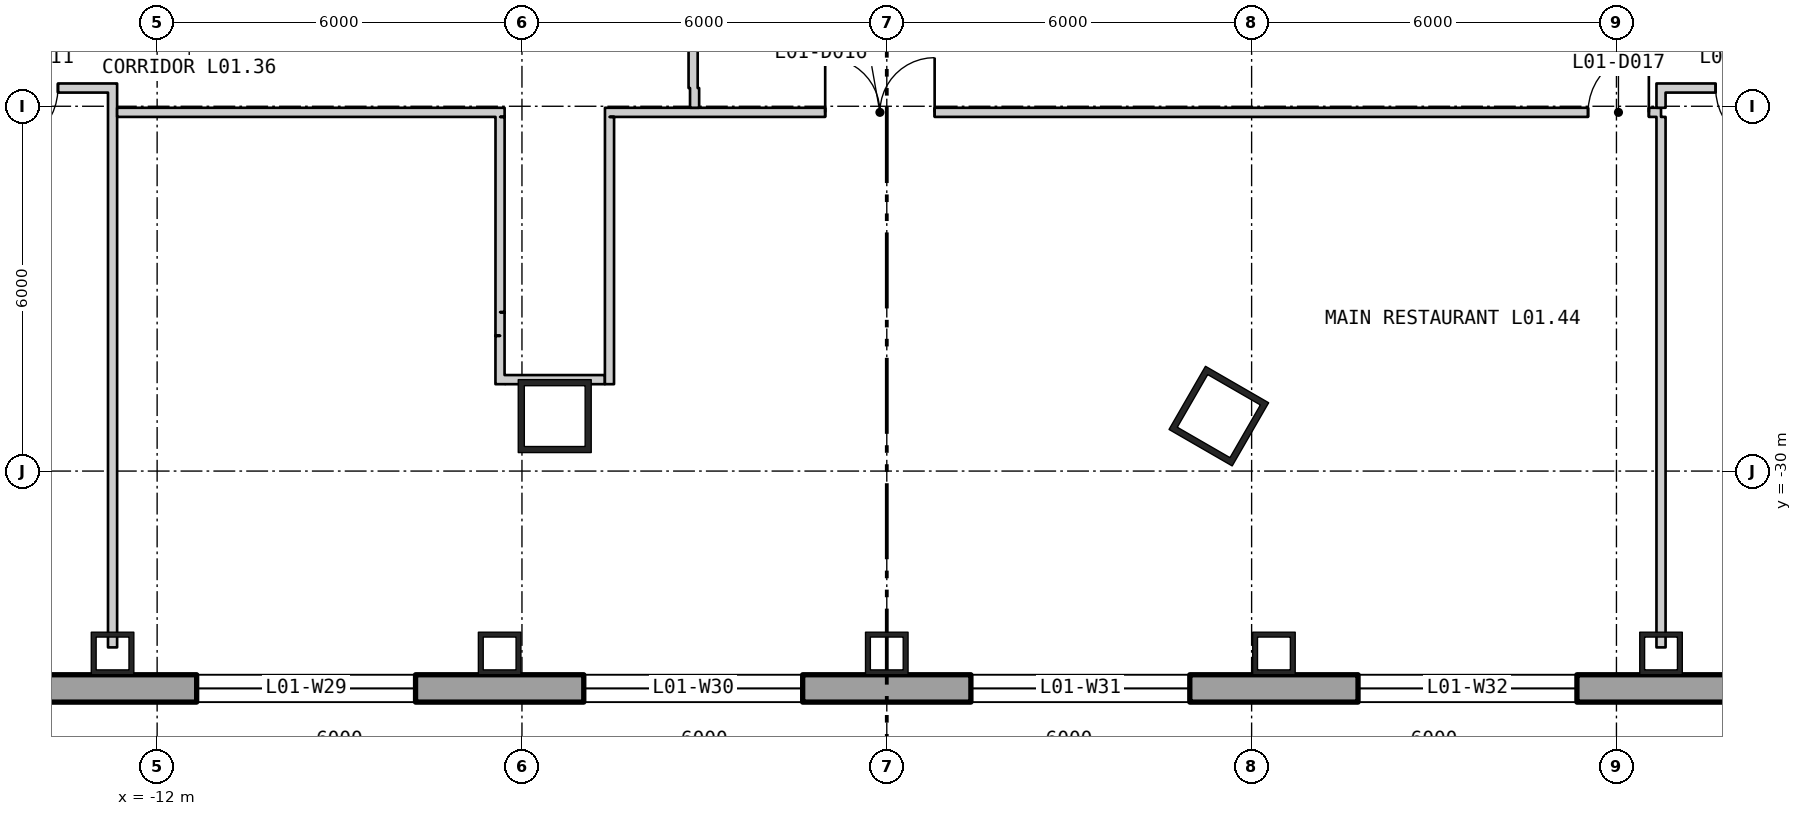
"""IFC4 building model, lengths in metres.
Left out: names, types, materials, properties, quantities, classifications, styles, units other than length and angle.
Written with IfcOpenShell. Run it as: python <this file> out.ifc"""

import sys

from ifc_helpers import new_model, si_unit, direction, frame, frame_2d, origin, origin_2d, place, context, subcontext, project, spatial, polyline, rectangle, hollow_rectangle, outline, extrude, element, fill, save


model = new_model("IFC4")
c1 = context("Model", 3, precision=1e-05, world=origin(), true_north=direction((0.0, 1.0)))
c2 = subcontext(c1, "Body", "Model", "MODEL_VIEW")
j1 = project(units=[si_unit("LENGTHUNIT", "METRE"), si_unit("PLANEANGLEUNIT", "RADIAN")], contexts=[c1])
p1 = place(None, origin())
s1 = spatial("IfcSite", under=j1, at=p1, CompositionType="ELEMENT")
p2 = place(p1, origin())
s2 = spatial("IfcBuilding", under=s1, at=p2, CompositionType="ELEMENT")
p3 = place(p2, frame((0.0, 0.0, 8.4)))
s3 = spatial("IfcBuildingStorey", under=s2, at=p3, CompositionType="ELEMENT", Elevation=8.4)
for number, where, z_axis, x_axis in (
    (1, (-5.461, -29.096, 0.0), (0.0, 0.0, 1.0), (1.0, 0.0, 0.0)),
    (2, (5.461, -29.096, 0.0), (0.0, 0.0, 1.0), (0.5, 0.866, 0.0)),
):
    element("IfcColumn", number, at=place(p3, frame(where, z_axis=z_axis, x_axis=x_axis)), inside=s3, PredefinedType="COLUMN", context=c2, shape_type="SweptSolid", body=[
        extrude(hollow_rectangle(XDim=1.2, YDim=1.2, WallThickness=0.1, at=origin_2d()), origin(), (0.0, 0.0, 1.0), 5.1),
    ])
for number, where, z_axis, x_axis in (
    (3, (-12.733, -33.0, 0.0), (0.0, 0.0, 1.0), (1.0, 0.0, 0.0)),
    (4, (-6.367, -33.0, 0.0), (0.0, 0.0, 1.0), (1.0, 0.0, 0.0)),
    (5, (0.0, -33.0, 0.0), (0.0, 0.0, 1.0), (1.0, 0.0, 0.0)),
    (6, (6.367, -33.0, 0.0), (0.0, 0.0, 1.0), (1.0, 0.0, 0.0)),
    (7, (12.733, -33.0, 0.0), (0.0, 0.0, 1.0), (1.0, 0.0, 0.0)),
):
    element("IfcColumn", number, at=place(p3, frame(where, z_axis=z_axis, x_axis=x_axis)), inside=s3, PredefinedType="COLUMN", context=c2, shape_type="SweptSolid", body=[
        extrude(hollow_rectangle(XDim=0.7, YDim=0.7, WallThickness=0.08, at=origin_2d()), origin(), (0.0, 0.0, 1.0), 5.1),
    ])
p4 = place(p3, frame((-38.775, -33.575, -0.4), z_axis=(0.0, 0.0, 1.0), x_axis=(1.0, 0.0, 0.0)))
e8 = element("IfcWall", 8, at=p4, inside=s3, PredefinedType="SOLIDWALL", context=c2, shape_type="SweptSolid", body=[
    extrude(outline(polyline([(-0.225, -0.225), (77.775, -0.225), (77.325, 0.225), (0.225, 0.225), (-0.225, -0.225)])), origin(), (0.0, 0.0, 1.0), 5.1),
])
p5 = place(p4, frame((1.958, 0.0, 1.3)))
e9 = element("IfcOpeningElement", 9, at=p5, cuts=e8, PredefinedType="OPENING", context=c2, shape_type="SweptSolid", body=[
    extrude(rectangle(XDim=3.6, YDim=3.2, at=frame_2d((1.8, 1.6))), frame((0.0, 0.235, 0.0), z_axis=(0.0, -1.0, 0.0), x_axis=(1.0, 0.0, 0.0)), (0.0, 0.0, 1.0), 0.47),
])
p6 = place(p4, frame((8.325, 0.0, 1.3)))
e10 = element("IfcOpeningElement", 10, at=p6, cuts=e8, PredefinedType="OPENING", context=c2, shape_type="SweptSolid", body=[
    extrude(rectangle(XDim=3.6, YDim=3.2, at=frame_2d((1.8, 1.6))), frame((0.0, 0.235, 0.0), z_axis=(0.0, -1.0, 0.0), x_axis=(1.0, 0.0, 0.0)), (0.0, 0.0, 1.0), 0.47),
])
p7 = place(p4, frame((14.692, 0.0, 1.3)))
e11 = element("IfcOpeningElement", 11, at=p7, cuts=e8, PredefinedType="OPENING", context=c2, shape_type="SweptSolid", body=[
    extrude(rectangle(XDim=3.6, YDim=3.2, at=frame_2d((1.8, 1.6))), frame((0.0, 0.235, 0.0), z_axis=(0.0, -1.0, 0.0), x_axis=(1.0, 0.0, 0.0)), (0.0, 0.0, 1.0), 0.47),
])
p8 = place(p4, frame((21.325, 0.0, 1.3)))
e12 = element("IfcOpeningElement", 12, at=p8, cuts=e8, PredefinedType="OPENING", context=c2, shape_type="SweptSolid", body=[
    extrude(rectangle(XDim=3.6, YDim=3.2, at=frame_2d((1.8, 1.6))), frame((0.0, 0.235, 0.0), z_axis=(0.0, -1.0, 0.0), x_axis=(1.0, 0.0, 0.0)), (0.0, 0.0, 1.0), 0.47),
])
p9 = place(p4, frame((27.425, 0.0, 1.3)))
e13 = element("IfcOpeningElement", 13, at=p9, cuts=e8, PredefinedType="OPENING", context=c2, shape_type="SweptSolid", body=[
    extrude(rectangle(XDim=3.6, YDim=3.2, at=frame_2d((1.8, 1.6))), frame((0.0, 0.235, 0.0), z_axis=(0.0, -1.0, 0.0), x_axis=(1.0, 0.0, 0.0)), (0.0, 0.0, 1.0), 0.47),
])
p10 = place(p4, frame((33.792, 0.0, 1.3)))
e14 = element("IfcOpeningElement", 14, at=p10, cuts=e8, PredefinedType="OPENING", context=c2, shape_type="SweptSolid", body=[
    extrude(rectangle(XDim=3.6, YDim=3.2, at=frame_2d((1.8, 1.6))), frame((0.0, 0.235, 0.0), z_axis=(0.0, -1.0, 0.0), x_axis=(1.0, 0.0, 0.0)), (0.0, 0.0, 1.0), 0.47),
])
p11 = place(p4, frame((40.158, 0.0, 1.3)))
e15 = element("IfcOpeningElement", 15, at=p11, cuts=e8, PredefinedType="OPENING", context=c2, shape_type="SweptSolid", body=[
    extrude(rectangle(XDim=3.6, YDim=3.2, at=frame_2d((1.8, 1.6))), frame((0.0, 0.235, 0.0), z_axis=(0.0, -1.0, 0.0), x_axis=(1.0, 0.0, 0.0)), (0.0, 0.0, 1.0), 0.47),
])
p12 = place(p4, frame((46.525, 0.0, 1.3)))
e16 = element("IfcOpeningElement", 16, at=p12, cuts=e8, PredefinedType="OPENING", context=c2, shape_type="SweptSolid", body=[
    extrude(rectangle(XDim=3.6, YDim=3.2, at=frame_2d((1.8, 1.6))), frame((0.0, 0.235, 0.0), z_axis=(0.0, -1.0, 0.0), x_axis=(1.0, 0.0, 0.0)), (0.0, 0.0, 1.0), 0.47),
])
p13 = place(p4, frame((52.625, 0.0, 1.3)))
e17 = element("IfcOpeningElement", 17, at=p13, cuts=e8, PredefinedType="OPENING", context=c2, shape_type="SweptSolid", body=[
    extrude(rectangle(XDim=3.6, YDim=3.2, at=frame_2d((1.8, 1.6))), frame((0.0, 0.235, 0.0), z_axis=(0.0, -1.0, 0.0), x_axis=(1.0, 0.0, 0.0)), (0.0, 0.0, 1.0), 0.47),
])
p14 = place(p4, frame((59.258, 0.0, 1.3)))
e18 = element("IfcOpeningElement", 18, at=p14, cuts=e8, PredefinedType="OPENING", context=c2, shape_type="SweptSolid", body=[
    extrude(rectangle(XDim=3.6, YDim=3.2, at=frame_2d((1.8, 1.6))), frame((0.0, 0.235, 0.0), z_axis=(0.0, -1.0, 0.0), x_axis=(1.0, 0.0, 0.0)), (0.0, 0.0, 1.0), 0.47),
])
p15 = place(p4, frame((65.625, 0.0, 1.3)))
e19 = element("IfcOpeningElement", 19, at=p15, cuts=e8, PredefinedType="OPENING", context=c2, shape_type="SweptSolid", body=[
    extrude(rectangle(XDim=3.6, YDim=3.2, at=frame_2d((1.8, 1.6))), frame((0.0, 0.235, 0.0), z_axis=(0.0, -1.0, 0.0), x_axis=(1.0, 0.0, 0.0)), (0.0, 0.0, 1.0), 0.47),
])
p16 = place(p4, frame((71.992, 0.0, 1.3)))
e20 = element("IfcOpeningElement", 20, at=p16, cuts=e8, PredefinedType="OPENING", context=c2, shape_type="SweptSolid", body=[
    extrude(rectangle(XDim=3.6, YDim=3.2, at=frame_2d((1.8, 1.6))), frame((0.0, 0.235, 0.0), z_axis=(0.0, -1.0, 0.0), x_axis=(1.0, 0.0, 0.0)), (0.0, 0.0, 1.0), 0.47),
])
p17 = place(p3, frame((-15.35, -23.7, 0.0), z_axis=(0.0, 0.0, 1.0), x_axis=(1.0, 0.0, 0.0)))
e21 = element("IfcWall", 21, at=p17, inside=s3, PredefinedType="PARTITIONING", context=c2, shape_type="SweptSolid", body=[
    extrude(rectangle(XDim=2.542, YDim=0.15, at=frame_2d((1.271, 0.0))), origin(), (0.0, 0.0, 1.0), 4.88),
])
p18 = place(p17, frame((0.719, 0.0, 0.0)))
e22 = element("IfcOpeningElement", 22, at=p18, cuts=e21, PredefinedType="OPENING", context=c2, shape_type="SweptSolid", body=[
    extrude(rectangle(XDim=1.0, YDim=2.1, at=frame_2d((0.5, 1.05))), frame((0.0, 0.085, 0.0), z_axis=(0.0, -1.0, 0.0), x_axis=(1.0, 0.0, 0.0)), (0.0, 0.0, 1.0), 0.17),
])
p19 = place(p3, frame((-12.733, -32.9, 0.0), z_axis=(0.0, 0.0, 1.0), x_axis=(0.0, 1.0, 0.0)))
e23 = element("IfcWall", 23, at=p19, inside=s3, PredefinedType="PARTITIONING", context=c2, shape_type="SweptSolid", body=[
    extrude(rectangle(XDim=9.275, YDim=0.15, at=frame_2d((4.638, 0.0))), origin(), (0.0, 0.0, 1.0), 4.19),
])
p20 = place(p3, frame((-12.658, -24.1, 0.0), z_axis=(0.0, 0.0, 1.0), x_axis=(1.0, 0.0, 0.0)))
e24 = element("IfcWall", 24, at=p20, inside=s3, PredefinedType="PARTITIONING", context=c2, shape_type="SweptSolid", body=[
    extrude(rectangle(XDim=6.373, YDim=0.15, at=frame_2d((3.187, 0.0))), origin(), (0.0, 0.0, 1.0), 4.88),
])
p21 = place(p3, frame((-6.361, -28.571, 0.0), z_axis=(0.0, 0.0, 1.0), x_axis=(0.000251572319, 0.999999968356, 0.0)))
e25 = element("IfcWall", 25, at=p21, inside=s3, PredefinedType="PARTITIONING", context=c2, shape_type="SweptSolid", body=[
    extrude(rectangle(XDim=0.795, YDim=0.15, at=frame_2d((0.398, 0.0))), origin(), (0.0, 0.0, 1.0), 4.28),
])
p22 = place(p3, frame((-6.361, -27.776, 0.0), z_axis=(0.0, 0.0, 1.0), x_axis=(0.000256410248, 0.999999967127, 0.0)))
e26 = element("IfcWall", 26, at=p22, inside=s3, PredefinedType="PARTITIONING", context=c2, shape_type="SweptSolid", body=[
    extrude(rectangle(XDim=0.39, YDim=0.15, at=frame_2d((0.195, 0.0))), origin(), (0.0, 0.0, 1.0), 4.88),
])
p23 = place(p3, frame((-6.361, -27.386, 0.0), z_axis=(0.0, 0.0, 1.0), x_axis=(0.000218000618, 0.999999976238, 0.0)))
e27 = element("IfcWall", 27, at=p23, inside=s3, PredefinedType="PARTITIONING", context=c2, shape_type="SweptSolid", body=[
    extrude(rectangle(XDim=3.211, YDim=0.15, at=frame_2d((1.605, 0.0))), origin(), (0.0, 0.0, 1.0), 4.28),
])
p24 = place(p3, frame((-6.286, -28.496, 0.0), z_axis=(0.0, 0.0, 1.0), x_axis=(1.0, 0.0, 0.0)))
e28 = element("IfcWall", 28, at=p24, inside=s3, PredefinedType="PARTITIONING", context=c2, shape_type="SweptSolid", body=[
    extrude(rectangle(XDim=1.65, YDim=0.15, at=frame_2d((0.825, 0.0))), origin(), (0.0, 0.0, 1.0), 4.88),
])
p25 = place(p3, frame((-4.635, -24.1, 0.0), z_axis=(0.0, 0.0, 1.0), x_axis=(1.0, 0.0, 0.0)))
e29 = element("IfcWall", 29, at=p25, inside=s3, PredefinedType="PARTITIONING", context=c2, shape_type="SweptSolid", body=[
    extrude(rectangle(XDim=17.368, YDim=0.15, at=frame_2d((8.684, 0.0))), origin(), (0.0, 0.0, 1.0), 4.88),
])
p26 = place(p25, frame((3.622, 0.0, 0.0)))
e30 = element("IfcOpeningElement", 30, at=p26, cuts=e29, PredefinedType="OPENING", context=c2, shape_type="SweptSolid", body=[
    extrude(rectangle(XDim=1.8, YDim=2.1, at=frame_2d((0.9, 1.05))), frame((0.0, 0.085, 0.0), z_axis=(0.0, -1.0, 0.0), x_axis=(1.0, 0.0, 0.0)), (0.0, 0.0, 1.0), 0.17),
])
p27 = place(p25, frame((16.168, 0.0, 0.0)))
e31 = element("IfcOpeningElement", 31, at=p27, cuts=e29, PredefinedType="OPENING", context=c2, shape_type="SweptSolid", body=[
    extrude(rectangle(XDim=1.0, YDim=2.1, at=frame_2d((0.5, 1.05))), frame((0.0, 0.085, 0.0), z_axis=(0.0, -1.0, 0.0), x_axis=(1.0, 0.0, 0.0)), (0.0, 0.0, 1.0), 0.17),
])
p28 = place(p3, frame((-4.561, -28.571, 0.0), z_axis=(0.0, 0.0, 1.0), x_axis=(0.000227479521, 0.999999974127, 0.0)))
e32 = element("IfcWall", 32, at=p28, inside=s3, PredefinedType="PARTITIONING", context=c2, shape_type="SweptSolid", body=[
    extrude(rectangle(XDim=4.396, YDim=0.15, at=frame_2d((2.198, 0.0))), origin(), (0.0, 0.0, 1.0), 4.88),
])
p29 = place(p3, frame((-3.185, -23.7, 0.0), z_axis=(0.0, 0.0, 1.0), x_axis=(0.0, 1.0, 0.0)))
e33 = element("IfcWall", 33, at=p29, inside=s3, PredefinedType="PARTITIONING", context=c2, shape_type="SweptSolid", body=[
    extrude(rectangle(XDim=2.325, YDim=0.15, at=frame_2d((1.163, 0.0))), origin(), (0.0, 0.0, 1.0), 4.28),
])
p30 = place(p29, frame((0.662, 0.0, 0.0)))
e34 = element("IfcOpeningElement", 34, at=p30, cuts=e33, PredefinedType="OPENING", context=c2, shape_type="SweptSolid", body=[
    extrude(rectangle(XDim=1.0, YDim=2.1, at=frame_2d((0.5, 1.05))), frame((0.0, 0.085, 0.0), z_axis=(0.0, -1.0, 0.0), x_axis=(1.0, 0.0, 0.0)), (0.0, 0.0, 1.0), 0.17),
])
p31 = place(p3, frame((-3.161, -24.025, 0.0), z_axis=(0.0, 0.0, 1.0), x_axis=(0.0, 1.0, 0.0)))
e35 = element("IfcWall", 35, at=p31, inside=s3, PredefinedType="PARTITIONING", context=c2, shape_type="SweptSolid", body=[
    extrude(rectangle(XDim=0.325, YDim=0.15, at=frame_2d((0.163, 0.0))), origin(), (0.0, 0.0, 1.0), 4.88),
])
p32 = place(p3, frame((12.733, -32.9, 0.0), z_axis=(0.0, 0.0, 1.0), x_axis=(0.0, 1.0, 0.0)))
e36 = element("IfcWall", 36, at=p32, inside=s3, PredefinedType="PARTITIONING", context=c2, shape_type="SweptSolid", body=[
    extrude(rectangle(XDim=8.725, YDim=0.15, at=frame_2d((4.362, 0.0))), origin(), (0.0, 0.0, 1.0), 4.19),
])
p33 = place(p3, frame((12.733, -24.025, 0.0), z_axis=(0.0, 0.0, 1.0), x_axis=(0.0, 1.0, 0.0)))
e37 = element("IfcWall", 37, at=p33, inside=s3, PredefinedType="PARTITIONING", context=c2, shape_type="SweptSolid", body=[
    extrude(rectangle(XDim=0.4, YDim=0.15, at=frame_2d((0.2, 0.0))), origin(), (0.0, 0.0, 1.0), 4.88),
])
p34 = place(p3, frame((12.808, -23.7, 0.0), z_axis=(0.0, 0.0, 1.0), x_axis=(1.0, 0.0, 0.0)))
e38 = element("IfcWall", 38, at=p34, inside=s3, PredefinedType="PARTITIONING", context=c2, shape_type="SweptSolid", body=[
    extrude(rectangle(XDim=2.542, YDim=0.15, at=frame_2d((1.271, 0.0))), origin(), (0.0, 0.0, 1.0), 4.88),
])
p35 = place(p34, frame((0.823, 0.0, 0.0)))
e39 = element("IfcOpeningElement", 39, at=p35, cuts=e38, PredefinedType="OPENING", context=c2, shape_type="SweptSolid", body=[
    extrude(rectangle(XDim=1.0, YDim=2.1, at=frame_2d((0.5, 1.05))), frame((0.0, 0.085, 0.0), z_axis=(0.0, -1.0, 0.0), x_axis=(1.0, 0.0, 0.0)), (0.0, 0.0, 1.0), 0.17),
])
p36 = place(p9, origin())
e40 = element("IfcWindow", 40, at=p36, inside=s3, PartitioningType="SINGLE_PANEL", PredefinedType="WINDOW", context=c2, shape_type="SweptSolid", body=[
    extrude(rectangle(XDim=3.6, YDim=3.2, at=frame_2d((1.8, 1.6))), frame((0.0, 0.105, 0.0), z_axis=(0.0, -1.0, 0.0), x_axis=(1.0, 0.0, 0.0)), (0.0, 0.0, 1.0), 0.06),
])
fill(e13, e40)
p37 = place(p10, origin())
e41 = element("IfcWindow", 41, at=p37, inside=s3, PartitioningType="SINGLE_PANEL", PredefinedType="WINDOW", context=c2, shape_type="SweptSolid", body=[
    extrude(rectangle(XDim=3.6, YDim=3.2, at=frame_2d((1.8, 1.6))), frame((0.0, 0.105, 0.0), z_axis=(0.0, -1.0, 0.0), x_axis=(1.0, 0.0, 0.0)), (0.0, 0.0, 1.0), 0.06),
])
fill(e14, e41)
p38 = place(p11, origin())
e42 = element("IfcWindow", 42, at=p38, inside=s3, PartitioningType="SINGLE_PANEL", PredefinedType="WINDOW", context=c2, shape_type="SweptSolid", body=[
    extrude(rectangle(XDim=3.6, YDim=3.2, at=frame_2d((1.8, 1.6))), frame((0.0, 0.105, 0.0), z_axis=(0.0, -1.0, 0.0), x_axis=(1.0, 0.0, 0.0)), (0.0, 0.0, 1.0), 0.06),
])
fill(e15, e42)
p39 = place(p12, origin())
e43 = element("IfcWindow", 43, at=p39, inside=s3, PartitioningType="SINGLE_PANEL", PredefinedType="WINDOW", context=c2, shape_type="SweptSolid", body=[
    extrude(rectangle(XDim=3.6, YDim=3.2, at=frame_2d((1.8, 1.6))), frame((0.0, 0.105, 0.0), z_axis=(0.0, -1.0, 0.0), x_axis=(1.0, 0.0, 0.0)), (0.0, 0.0, 1.0), 0.06),
])
fill(e16, e43)
p40 = place(p18, origin())
e44 = element("IfcDoor", 44, at=p40, inside=s3, OperationType="SINGLE_SWING_LEFT", PredefinedType="DOOR", context=c2, shape_type="SweptSolid", body=[
    extrude(rectangle(XDim=1.0, YDim=2.1, at=frame_2d((0.5, 1.05))), frame((0.0, 0.025, 0.0), z_axis=(0.0, -1.0, 0.0), x_axis=(1.0, 0.0, 0.0)), (0.0, 0.0, 1.0), 0.05),
])
fill(e22, e44)
p41 = place(p26, origin())
e45 = element("IfcDoor", 45, at=p41, inside=s3, OperationType="DOUBLE_DOOR_SINGLE_SWING", PredefinedType="DOOR", context=c2, shape_type="SweptSolid", body=[
    extrude(rectangle(XDim=1.8, YDim=2.1, at=frame_2d((0.9, 1.05))), frame((0.0, 0.025, 0.0), z_axis=(0.0, -1.0, 0.0), x_axis=(1.0, 0.0, 0.0)), (0.0, 0.0, 1.0), 0.05),
])
fill(e30, e45)
p42 = place(p27, origin())
e46 = element("IfcDoor", 46, at=p42, inside=s3, OperationType="SINGLE_SWING_LEFT", PredefinedType="DOOR", context=c2, shape_type="SweptSolid", body=[
    extrude(rectangle(XDim=1.0, YDim=2.1, at=frame_2d((0.5, 1.05))), frame((0.0, 0.025, 0.0), z_axis=(0.0, -1.0, 0.0), x_axis=(1.0, 0.0, 0.0)), (0.0, 0.0, 1.0), 0.05),
])
fill(e31, e46)
p43 = place(p35, origin())
e47 = element("IfcDoor", 47, at=p43, inside=s3, OperationType="SINGLE_SWING_RIGHT", PredefinedType="DOOR", context=c2, shape_type="SweptSolid", body=[
    extrude(rectangle(XDim=1.0, YDim=2.1, at=frame_2d((0.5, 1.05))), frame((0.0, 0.025, 0.0), z_axis=(0.0, -1.0, 0.0), x_axis=(1.0, 0.0, 0.0)), (0.0, 0.0, 1.0), 0.05),
])
fill(e39, e47)
save(model, sys.argv[1])
